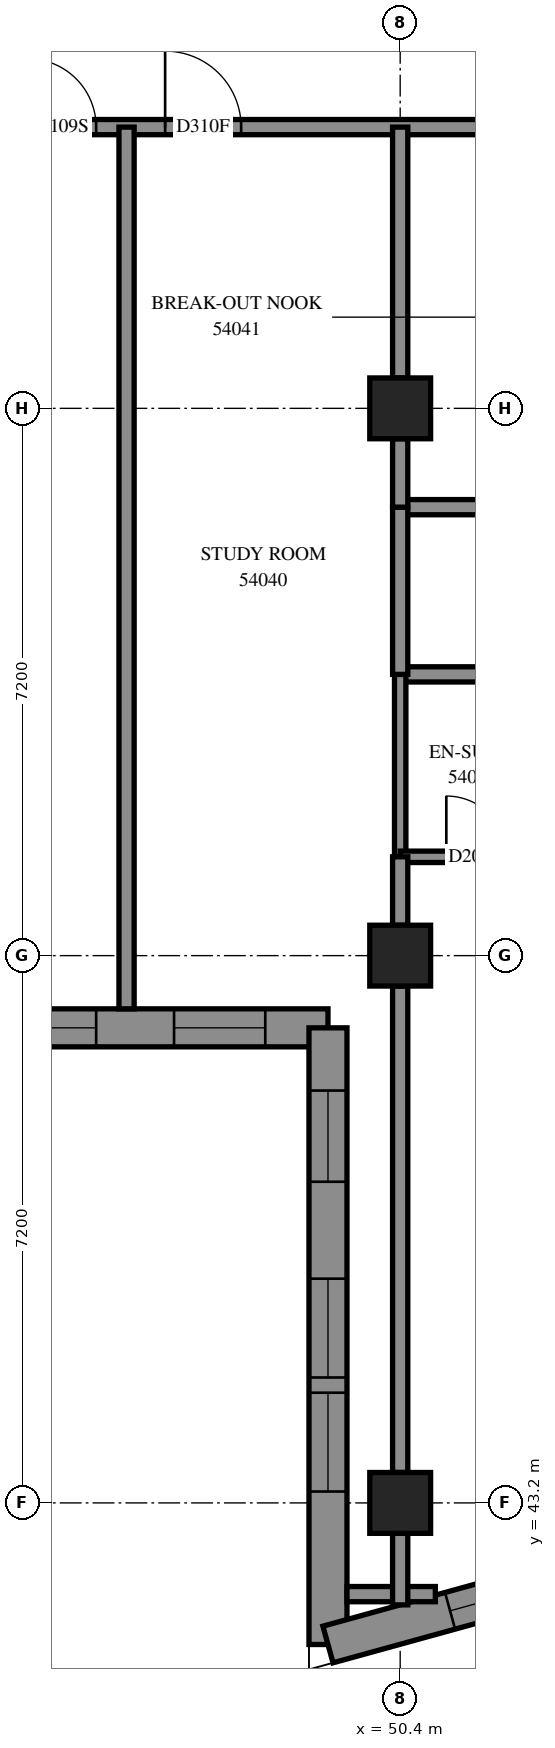
"""IFC4 building model, lengths in metres.
Left out: names, types, materials, properties, quantities, classifications, styles, units other than length and angle.
Written with IfcOpenShell. Run it as: python <this file> out.ifc"""

import sys

from ifc_helpers import new_model, si_unit, direction, frame, frame_2d, origin, origin_2d, place, context, subcontext, project, spatial, polyline, rectangle, outline, extrude, element, fill, save


model = new_model("IFC4")
c1 = context("Model", 3, precision=1e-05, world=origin(), true_north=direction((0.0, 1.0)))
c2 = subcontext(c1, "Body", "Model", "MODEL_VIEW")
j1 = project(units=[si_unit("LENGTHUNIT", "METRE"), si_unit("PLANEANGLEUNIT", "RADIAN")], contexts=[c1])
p1 = place(None, origin())
s1 = spatial("IfcSite", under=j1, at=p1, CompositionType="ELEMENT")
p2 = place(p1, origin())
s2 = spatial("IfcBuilding", under=s1, at=p2, CompositionType="ELEMENT")
p3 = place(p2, frame((0.0, 0.0, 199.8)))
s3 = spatial("IfcBuildingStorey", under=s2, at=p3, CompositionType="ELEMENT", Elevation=199.8)
for number, where, z_axis, x_axis in (
    (1, (50.4, 43.2, 0.0), (0.0, 0.0, 1.0), (1.0, 0.0, 0.0)),
    (2, (50.4, 50.4, 0.0), (0.0, 0.0, 1.0), (1.0, 0.0, 0.0)),
    (3, (50.4, 57.6, 0.0), (0.0, 0.0, 1.0), (1.0, 0.0, 0.0)),
):
    element("IfcColumn", number, at=place(p3, frame(where, z_axis=z_axis, x_axis=x_axis)), inside=s3, PredefinedType="COLUMN", context=c2, shape_type="SweptSolid", body=[
        extrude(rectangle(XDim=0.8, YDim=0.8, at=origin_2d()), origin(), (0.0, 0.0, 1.0), 3.1),
    ])
p4 = place(p3, frame((42.25, 49.45, 0.0), z_axis=(0.0, 0.0, 1.0), x_axis=(1.0, 0.0, 0.0)))
e4 = element("IfcWall", 4, at=p4, inside=s3, PredefinedType="SOLIDWALL", context=c2, shape_type="SweptSolid", body=[
    extrude(outline(polyline([(-0.25, -0.25), (6.95, -0.25), (7.45, 0.25), (0.25, 0.25), (-0.25, -0.25)])), origin(), (0.0, 0.0, 1.0), 3.1),
])
p5 = place(p4, frame((1.35, 0.0, 0.45)))
e5 = element("IfcOpeningElement", 5, at=p5, cuts=e4, PredefinedType="OPENING", context=c2, shape_type="SweptSolid", body=[
    extrude(rectangle(XDim=1.3, YDim=2.5, at=frame_2d((0.65, 1.25))), frame((0.0, 0.26, 0.0), z_axis=(0.0, -1.0, 0.0), x_axis=(1.0, 0.0, 0.0)), (0.0, 0.0, 1.0), 0.52),
])
p6 = place(p4, frame((2.85, 0.0, 0.45)))
e6 = element("IfcOpeningElement", 6, at=p6, cuts=e4, PredefinedType="OPENING", context=c2, shape_type="SweptSolid", body=[
    extrude(rectangle(XDim=1.3, YDim=2.5, at=frame_2d((0.65, 1.25))), frame((0.0, 0.26, 0.0), z_axis=(0.0, -1.0, 0.0), x_axis=(1.0, 0.0, 0.0)), (0.0, 0.0, 1.0), 0.52),
])
p7 = place(p4, frame((5.175, 0.0, 0.45)))
e7 = element("IfcOpeningElement", 7, at=p7, cuts=e4, PredefinedType="OPENING", context=c2, shape_type="SweptSolid", body=[
    extrude(rectangle(XDim=1.2, YDim=2.5, at=frame_2d((0.6, 1.25))), frame((0.0, 0.26, 0.0), z_axis=(0.0, -1.0, 0.0), x_axis=(1.0, 0.0, 0.0)), (0.0, 0.0, 1.0), 0.52),
])
p8 = place(p3, frame((49.45, 49.45, 0.0), z_axis=(0.0, 0.0, 1.0), x_axis=(0.0, -1.0, 0.0)))
e8 = element("IfcWall", 8, at=p8, inside=s3, PredefinedType="SOLIDWALL", context=c2, shape_type="SweptSolid", body=[
    extrude(outline(polyline([(0.25, -0.25), (8.441, -0.25), (7.784, 0.25), (-0.25, 0.25), (0.25, -0.25)])), origin(), (0.0, 0.0, 1.0), 3.1),
])
p9 = place(p8, frame((3.3, 0.0, 0.45)))
e9 = element("IfcOpeningElement", 9, at=p9, cuts=e8, PredefinedType="OPENING", context=c2, shape_type="SweptSolid", body=[
    extrude(rectangle(XDim=1.3, YDim=2.5, at=frame_2d((0.65, 1.25))), frame((0.0, 0.26, 0.0), z_axis=(0.0, -1.0, 0.0), x_axis=(1.0, 0.0, 0.0)), (0.0, 0.0, 1.0), 0.52),
])
p10 = place(p8, frame((4.8, 0.0, 0.45)))
e10 = element("IfcOpeningElement", 10, at=p10, cuts=e8, PredefinedType="OPENING", context=c2, shape_type="SweptSolid", body=[
    extrude(rectangle(XDim=1.3, YDim=2.5, at=frame_2d((0.65, 1.25))), frame((0.0, 0.26, 0.0), z_axis=(0.0, -1.0, 0.0), x_axis=(1.0, 0.0, 0.0)), (0.0, 0.0, 1.0), 0.52),
])
p11 = place(p8, frame((0.825, 0.0, 0.45)))
e11 = element("IfcOpeningElement", 11, at=p11, cuts=e8, PredefinedType="OPENING", context=c2, shape_type="SweptSolid", body=[
    extrude(rectangle(XDim=1.2, YDim=2.5, at=frame_2d((0.6, 1.25))), frame((0.0, 0.26, 0.0), z_axis=(0.0, -1.0, 0.0), x_axis=(1.0, 0.0, 0.0)), (0.0, 0.0, 1.0), 0.52),
])
p12 = place(p3, frame((49.45, 41.337, 0.0), z_axis=(0.0, 0.0, 1.0), x_axis=(0.964012106, 0.2658583448, 0.0)))
e12 = element("IfcWall", 12, at=p12, inside=s3, PredefinedType="SOLIDWALL", context=c2, shape_type="SweptSolid", body=[
    extrude(outline(polyline([(-0.328, -0.25), (3.399, -0.25), (3.495, 0.25), (0.328, 0.25), (-0.328, -0.25)])), origin(), (0.0, 0.0, 1.0), 3.1),
])
p13 = place(p12, frame((1.666, 0.0, 0.45)))
e13 = element("IfcOpeningElement", 13, at=p13, cuts=e12, PredefinedType="OPENING", context=c2, shape_type="SweptSolid", body=[
    extrude(rectangle(XDim=1.2, YDim=2.5, at=frame_2d((0.6, 1.25))), frame((0.0, 0.26, 0.0), z_axis=(0.0, -1.0, 0.0), x_axis=(1.0, 0.0, 0.0)), (0.0, 0.0, 1.0), 0.52),
])
p14 = place(p3, frame((36.0, 61.3, 0.0), z_axis=(0.0, 0.0, 1.0), x_axis=(1.0, 0.0, 0.0)))
e14 = element("IfcWall", 14, at=p14, inside=s3, PredefinedType="PARTITIONING", context=c2, shape_type="SweptSolid", body=[
    extrude(rectangle(XDim=16.9, YDim=0.2, at=frame_2d((8.45, 0.0))), origin(), (0.0, 0.0, 1.0), 3.1),
])
p15 = place(p14, frame((2.3, 0.0, 0.0)))
e15 = element("IfcOpeningElement", 15, at=p15, cuts=e14, PredefinedType="OPENING", context=c2, shape_type="SweptSolid", body=[
    extrude(rectangle(XDim=0.9, YDim=2.1, at=frame_2d((0.45, 1.05))), frame((0.0, 0.11, 0.0), z_axis=(0.0, -1.0, 0.0), x_axis=(1.0, 0.0, 0.0)), (0.0, 0.0, 1.0), 0.22),
])
p16 = place(p14, frame((4.107, 0.0, 0.0)))
e16 = element("IfcOpeningElement", 16, at=p16, cuts=e14, PredefinedType="OPENING", context=c2, shape_type="SweptSolid", body=[
    extrude(rectangle(XDim=1.0, YDim=2.1, at=frame_2d((0.5, 1.05))), frame((0.0, 0.11, 0.0), z_axis=(0.0, -1.0, 0.0), x_axis=(1.0, 0.0, 0.0)), (0.0, 0.0, 1.0), 0.22),
])
p17 = place(p14, frame((9.5, 0.0, 0.0)))
e17 = element("IfcOpeningElement", 17, at=p17, cuts=e14, PredefinedType="OPENING", context=c2, shape_type="SweptSolid", body=[
    extrude(rectangle(XDim=0.9, YDim=2.1, at=frame_2d((0.45, 1.05))), frame((0.0, 0.11, 0.0), z_axis=(0.0, -1.0, 0.0), x_axis=(1.0, 0.0, 0.0)), (0.0, 0.0, 1.0), 0.22),
])
p18 = place(p14, frame((11.307, 0.0, 0.0)))
e18 = element("IfcOpeningElement", 18, at=p18, cuts=e14, PredefinedType="OPENING", context=c2, shape_type="SweptSolid", body=[
    extrude(rectangle(XDim=1.0, YDim=2.1, at=frame_2d((0.5, 1.05))), frame((0.0, 0.11, 0.0), z_axis=(0.0, -1.0, 0.0), x_axis=(1.0, 0.0, 0.0)), (0.0, 0.0, 1.0), 0.22),
])
p19 = place(p14, frame((15.647, 0.0, 0.0)))
e19 = element("IfcOpeningElement", 19, at=p19, cuts=e14, PredefinedType="OPENING", context=c2, shape_type="SweptSolid", body=[
    extrude(rectangle(XDim=1.0, YDim=2.1, at=frame_2d((0.5, 1.05))), frame((0.0, 0.11, 0.0), z_axis=(0.0, -1.0, 0.0), x_axis=(1.0, 0.0, 0.0)), (0.0, 0.0, 1.0), 0.22),
])
p20 = place(p3, frame((46.8, 49.7, 0.0), z_axis=(0.0, 0.0, 1.0), x_axis=(0.0, 1.0, 0.0)))
e20 = element("IfcWall", 20, at=p20, inside=s3, PredefinedType="PARTITIONING", context=c2, shape_type="SweptSolid", body=[
    extrude(rectangle(XDim=11.6, YDim=0.2, at=frame_2d((5.8, 0.0))), origin(), (0.0, 0.0, 1.0), 3.1),
])
p21 = place(p3, frame((50.4, 43.6, 0.0), z_axis=(0.0, 0.0, 1.0), x_axis=(0.0, 1.0, 0.0)))
e21 = element("IfcWall", 21, at=p21, inside=s3, PredefinedType="PARTITIONING", context=c2, shape_type="SweptSolid", body=[
    extrude(rectangle(XDim=6.4, YDim=0.2, at=frame_2d((3.2, 0.0))), origin(), (0.0, 0.0, 1.0), 2.6),
])
p22 = place(p3, frame((50.4, 54.1, 0.0), z_axis=(0.0, 0.0, 1.0), x_axis=(1.0, 0.0, 0.0)))
e22 = element("IfcWall", 22, at=p22, inside=s3, PredefinedType="PARTITIONING", context=c2, shape_type="SweptSolid", body=[
    extrude(rectangle(XDim=4.6, YDim=0.2, at=frame_2d((2.3, 0.0))), origin(), (0.0, 0.0, 1.0), 3.1),
])
p23 = place(p22, frame((2.3, 0.0, 0.0)))
e23 = element("IfcOpeningElement", 23, at=p23, cuts=e22, PredefinedType="OPENING", context=c2, shape_type="SweptSolid", body=[
    extrude(rectangle(XDim=0.9, YDim=2.1, at=frame_2d((0.45, 1.05))), frame((0.0, 0.11, 0.0), z_axis=(0.0, -1.0, 0.0), x_axis=(1.0, 0.0, 0.0)), (0.0, 0.0, 1.0), 0.22),
])
p24 = place(p3, frame((50.4, 58.0, 0.0), z_axis=(0.0, 0.0, 1.0), x_axis=(0.0, 1.0, 0.0)))
e24 = element("IfcWall", 24, at=p24, inside=s3, PredefinedType="PARTITIONING", context=c2, shape_type="SweptSolid", body=[
    extrude(rectangle(XDim=3.3, YDim=0.2, at=frame_2d((1.65, 0.0))), origin(), (0.0, 0.0, 1.0), 3.1),
])
p25 = place(p3, frame((50.4, 56.3, 0.0), z_axis=(0.0, 0.0, 1.0), x_axis=(1.0, 0.0, 0.0)))
e25 = element("IfcWall", 25, at=p25, inside=s3, PredefinedType="PARTITIONING", context=c2, shape_type="SweptSolid", body=[
    extrude(rectangle(XDim=2.5, YDim=0.2, at=frame_2d((1.25, 0.0))), origin(), (0.0, 0.0, 1.0), 3.1),
])
p26 = place(p3, frame((50.4, 51.7, 0.0), z_axis=(0.0, 0.0, 1.0), x_axis=(0.0, 1.0, 0.0)))
e26 = element("IfcWall", 26, at=p26, inside=s3, PredefinedType="PARTITIONING", context=c2, shape_type="SweptSolid", body=[
    extrude(rectangle(XDim=2.4, YDim=0.15, at=frame_2d((1.2, 0.0))), origin(), (0.0, 0.0, 1.0), 3.1),
])
p27 = place(p3, frame((50.4, 54.1, 0.0), z_axis=(0.0, 0.0, 1.0), x_axis=(0.0, 1.0, 0.0)))
e27 = element("IfcWall", 27, at=p27, inside=s3, PredefinedType="PARTITIONING", context=c2, shape_type="SweptSolid", body=[
    extrude(rectangle(XDim=2.2, YDim=0.2, at=frame_2d((1.1, 0.0))), origin(), (0.0, 0.0, 1.0), 3.1),
])
p28 = place(p3, frame((50.4, 51.7, 0.0), z_axis=(0.0, 0.0, 1.0), x_axis=(1.0, 0.0, 0.0)))
e28 = element("IfcWall", 28, at=p28, inside=s3, PredefinedType="PARTITIONING", context=c2, shape_type="SweptSolid", body=[
    extrude(rectangle(XDim=1.9, YDim=0.15, at=frame_2d((0.95, 0.0))), origin(), (0.0, 0.0, 1.0), 3.1),
])
p29 = place(p28, frame((0.607, 0.0, 0.0)))
e29 = element("IfcOpeningElement", 29, at=p29, cuts=e28, PredefinedType="OPENING", context=c2, shape_type="SweptSolid", body=[
    extrude(rectangle(XDim=0.8, YDim=2.1, at=frame_2d((0.4, 1.05))), frame((0.0, 0.085, 0.0), z_axis=(0.0, -1.0, 0.0), x_axis=(1.0, 0.0, 0.0)), (0.0, 0.0, 1.0), 0.17),
])
p30 = place(p3, frame((49.7, 42.0, 0.0), z_axis=(0.0, 0.0, 1.0), x_axis=(1.0, 0.0, 0.0)))
e30 = element("IfcWall", 30, at=p30, inside=s3, PredefinedType="PARTITIONING", context=c2, shape_type="SweptSolid", body=[
    extrude(rectangle(XDim=1.163, YDim=0.2, at=frame_2d((0.581, 0.0))), origin(), (0.0, 0.0, 1.0), 3.1),
])
for number, where, z_axis, x_axis in (
    (31, (50.4, 50.8, 0.0), (0.0, 0.0, 1.0), (0.0, 1.0, 0.0)),
    (32, (50.4, 56.3, 0.0), (0.0, 0.0, 1.0), (0.0, 1.0, 0.0)),
):
    element("IfcWall", number, at=place(p3, frame(where, z_axis=z_axis, x_axis=x_axis)), inside=s3, PredefinedType="PARTITIONING", context=c2, shape_type="SweptSolid", body=[
        extrude(rectangle(XDim=0.9, YDim=0.2, at=frame_2d((0.45, 0.0))), origin(), (0.0, 0.0, 1.0), 3.1),
    ])
p31 = place(p3, frame((50.4, 41.859, 0.0), z_axis=(0.0, 0.0, 1.0), x_axis=(0.0, 1.0, 0.0)))
e33 = element("IfcWall", 33, at=p31, inside=s3, PredefinedType="PARTITIONING", context=c2, shape_type="SweptSolid", body=[
    extrude(rectangle(XDim=0.941, YDim=0.2, at=frame_2d((0.471, 0.0))), origin(), (0.0, 0.0, 1.0), 3.1),
])
p32 = place(p6, origin())
e34 = element("IfcWindow", 34, at=p32, inside=s3, PartitioningType="SINGLE_PANEL", PredefinedType="WINDOW", context=c2, shape_type="SweptSolid", body=[
    extrude(rectangle(XDim=1.3, YDim=2.5, at=frame_2d((0.65, 1.25))), frame((0.0, 0.18, 0.0), z_axis=(0.0, -1.0, 0.0), x_axis=(1.0, 0.0, 0.0)), (0.0, 0.0, 1.0), 0.06),
])
fill(e6, e34)
p33 = place(p7, origin())
e35 = element("IfcWindow", 35, at=p33, inside=s3, PartitioningType="SINGLE_PANEL", PredefinedType="WINDOW", context=c2, shape_type="SweptSolid", body=[
    extrude(rectangle(XDim=1.2, YDim=2.5, at=frame_2d((0.6, 1.25))), frame((0.0, 0.18, 0.0), z_axis=(0.0, -1.0, 0.0), x_axis=(1.0, 0.0, 0.0)), (0.0, 0.0, 1.0), 0.06),
])
fill(e7, e35)
p34 = place(p9, origin())
e36 = element("IfcWindow", 36, at=p34, inside=s3, PartitioningType="SINGLE_PANEL", PredefinedType="WINDOW", context=c2, shape_type="SweptSolid", body=[
    extrude(rectangle(XDim=1.3, YDim=2.5, at=frame_2d((0.65, 1.25))), frame((0.0, 0.18, 0.0), z_axis=(0.0, -1.0, 0.0), x_axis=(1.0, 0.0, 0.0)), (0.0, 0.0, 1.0), 0.06),
])
fill(e9, e36)
p35 = place(p10, origin())
e37 = element("IfcWindow", 37, at=p35, inside=s3, PartitioningType="SINGLE_PANEL", PredefinedType="WINDOW", context=c2, shape_type="SweptSolid", body=[
    extrude(rectangle(XDim=1.3, YDim=2.5, at=frame_2d((0.65, 1.25))), frame((0.0, 0.18, 0.0), z_axis=(0.0, -1.0, 0.0), x_axis=(1.0, 0.0, 0.0)), (0.0, 0.0, 1.0), 0.06),
])
fill(e10, e37)
p36 = place(p11, origin())
e38 = element("IfcWindow", 38, at=p36, inside=s3, PartitioningType="SINGLE_PANEL", PredefinedType="WINDOW", context=c2, shape_type="SweptSolid", body=[
    extrude(rectangle(XDim=1.2, YDim=2.5, at=frame_2d((0.6, 1.25))), frame((0.0, 0.18, 0.0), z_axis=(0.0, -1.0, 0.0), x_axis=(1.0, 0.0, 0.0)), (0.0, 0.0, 1.0), 0.06),
])
fill(e11, e38)
p37 = place(p13, origin())
e39 = element("IfcWindow", 39, at=p37, inside=s3, PartitioningType="SINGLE_PANEL", PredefinedType="WINDOW", context=c2, shape_type="SweptSolid", body=[
    extrude(rectangle(XDim=1.2, YDim=2.5, at=frame_2d((0.6, 1.25))), frame((0.0, 0.18, 0.0), z_axis=(0.0, -1.0, 0.0), x_axis=(1.0, 0.0, 0.0)), (0.0, 0.0, 1.0), 0.06),
])
fill(e13, e39)
p38 = place(p17, origin())
e40 = element("IfcDoor", 40, at=p38, inside=s3, OperationType="SINGLE_SWING_LEFT", PredefinedType="DOOR", context=c2, shape_type="SweptSolid", body=[
    extrude(rectangle(XDim=0.9, YDim=2.1, at=frame_2d((0.45, 1.05))), frame((0.0, 0.025, 0.0), z_axis=(0.0, -1.0, 0.0), x_axis=(1.0, 0.0, 0.0)), (0.0, 0.0, 1.0), 0.05),
])
fill(e17, e40)
p39 = place(p18, origin())
e41 = element("IfcDoor", 41, at=p39, inside=s3, OperationType="SINGLE_SWING_RIGHT", PredefinedType="DOOR", context=c2, shape_type="SweptSolid", body=[
    extrude(rectangle(XDim=1.0, YDim=2.1, at=frame_2d((0.5, 1.05))), frame((0.0, 0.025, 0.0), z_axis=(0.0, -1.0, 0.0), x_axis=(1.0, 0.0, 0.0)), (0.0, 0.0, 1.0), 0.05),
])
fill(e18, e41)
p40 = place(p29, origin())
e42 = element("IfcDoor", 42, at=p40, inside=s3, OperationType="SINGLE_SWING_RIGHT", PredefinedType="DOOR", context=c2, shape_type="SweptSolid", body=[
    extrude(rectangle(XDim=0.8, YDim=2.1, at=frame_2d((0.4, 1.05))), frame((0.0, 0.025, 0.0), z_axis=(0.0, -1.0, 0.0), x_axis=(1.0, 0.0, 0.0)), (0.0, 0.0, 1.0), 0.05),
])
fill(e29, e42)
save(model, sys.argv[1])
